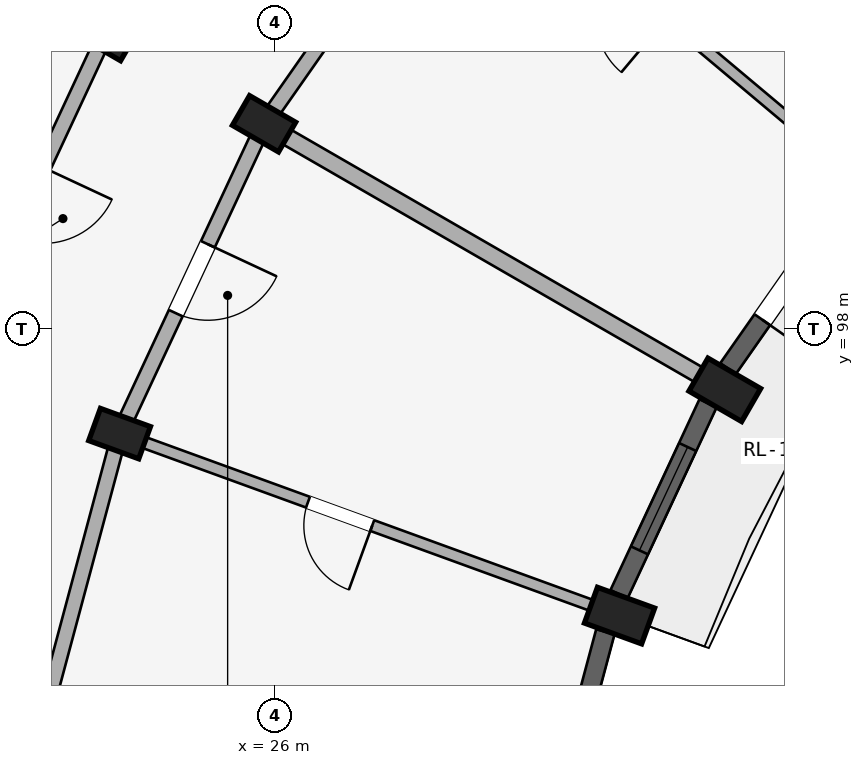
"""IFC4 building model, lengths in metres.
Left out: names, types, materials, properties, quantities, classifications, styles, units other than length and angle.
Written with IfcOpenShell. Run it as: python <this file> out.ifc"""

import sys

from ifc_helpers import new_model, si_unit, direction, frame, frame_2d, origin, origin_2d, place, context, subcontext, project, spatial, rectangle, extrude, element, fill, save


model = new_model("IFC4")
c1 = context("Model", 3, precision=1e-05, world=origin(), true_north=direction((0.0, 1.0)))
c2 = subcontext(c1, "Body", "Model", "MODEL_VIEW")
j1 = project(units=[si_unit("LENGTHUNIT", "METRE"), si_unit("PLANEANGLEUNIT", "RADIAN")], contexts=[c1])
p1 = place(None, origin())
s1 = spatial("IfcSite", under=j1, at=p1, CompositionType="ELEMENT")
p2 = place(p1, origin())
s2 = spatial("IfcBuilding", under=s1, at=p2, CompositionType="ELEMENT")
p3 = place(p2, frame((0.0, 0.0, 24.45)))
s3 = spatial("IfcBuildingStorey", under=s2, at=p3, CompositionType="ELEMENT", Elevation=24.45)
p4 = place(p3, frame((31.919, 97.2, 0.0), z_axis=(0.0, 0.0, 1.0), x_axis=(0.5, 0.866025403784, 0.0)))
e1 = element("IfcColumn", 1, at=p4, inside=s3, PredefinedType="COLUMN", context=c2, shape_type="SweptSolid", body=[
    extrude(rectangle(XDim=0.5, YDim=0.8, at=origin_2d()), origin(), (0.0, 0.0, 1.0), 2.93),
])
for number, where, z_axis, x_axis in (
    (2, (25.856, 100.7, 0.0), (0.0, 0.0, 1.0), (0.5, 0.866, 0.0)),
    (3, (23.778, 101.9, 0.0), (0.0, 0.0, 1.0), (0.5, 0.866, 0.0)),
):
    element("IfcColumn", number, at=place(p3, frame(where, z_axis=z_axis, x_axis=x_axis)), inside=s3, PredefinedType="COLUMN", context=c2, shape_type="SweptSolid", body=[
        extrude(rectangle(XDim=0.45, YDim=0.7, at=origin_2d()), origin(), (0.0, 0.0, 1.0), 2.93),
    ])
p5 = place(p3, frame((30.534, 94.23, 0.0), z_axis=(0.0, 0.0, 1.0), x_axis=(0.342020143326, 0.939692620786, 0.0)))
e4 = element("IfcColumn", 4, at=p5, inside=s3, PredefinedType="COLUMN", context=c2, shape_type="SweptSolid", body=[
    extrude(rectangle(XDim=0.5, YDim=0.8, at=origin_2d()), origin(), (0.0, 0.0, 1.0), 2.93),
])
p6 = place(p3, frame((23.956, 96.624, 0.0), z_axis=(0.0, 0.0, 1.0), x_axis=(0.342020143326, 0.939692620786, 0.0)))
e5 = element("IfcColumn", 5, at=p6, inside=s3, PredefinedType="COLUMN", context=c2, shape_type="SweptSolid", body=[
    extrude(rectangle(XDim=0.45, YDim=0.7, at=origin_2d()), origin(), (0.0, 0.0, 1.0), 2.93),
])
p7 = place(p3, frame((28.436, 104.384, 0.0), z_axis=(0.0, 0.0, 1.0), x_axis=(-0.573571637217, -0.819155404658, 0.0)))
e6 = element("IfcWall", 6, at=p7, inside=s3, PredefinedType="STANDARD", context=c2, shape_type="SweptSolid", body=[
    extrude(rectangle(XDim=4.497, YDim=0.2, at=frame_2d((2.249, 0.0))), origin(), (0.0, 0.0, 1.0), 2.372),
])
p8 = place(p3, frame((25.856, 100.7, 0.0), z_axis=(0.0, 0.0, 1.0), x_axis=(-0.422617978463, -0.906307919131, 0.0)))
e7 = element("IfcWall", 7, at=p8, inside=s3, PredefinedType="STANDARD", context=c2, shape_type="SweptSolid", body=[
    extrude(rectangle(XDim=4.497, YDim=0.2, at=frame_2d((2.249, 0.0))), origin(), (0.0, 0.0, 1.0), 2.372),
])
p9 = place(p8, frame((1.749, 0.0, 0.0)))
e8 = element("IfcOpeningElement", 8, at=p9, cuts=e7, PredefinedType="OPENING", context=c2, shape_type="SweptSolid", body=[
    extrude(rectangle(XDim=1.0, YDim=2.15, at=frame_2d((0.5, 1.075))), frame((0.0, 0.11, 0.0), z_axis=(0.0, -1.0, 0.0), x_axis=(1.0, 0.0, 0.0)), (0.0, 0.0, 1.0), 0.22),
])
p10 = place(p3, frame((23.778, 101.9, 0.0), z_axis=(0.0, 0.0, 1.0), x_axis=(-0.422629854778, -0.906302381024, 0.0)))
e9 = element("IfcWall", 9, at=p10, inside=s3, PredefinedType="STANDARD", context=c2, shape_type="SweptSolid", body=[
    extrude(rectangle(XDim=4.915, YDim=0.2, at=frame_2d((2.458, 0.0))), origin(), (0.0, 0.0, 1.0), 2.372),
])
p11 = place(p10, frame((1.958, 0.0, 0.0)))
e10 = element("IfcOpeningElement", 10, at=p11, cuts=e9, PredefinedType="OPENING", context=c2, shape_type="SweptSolid", body=[
    extrude(rectangle(XDim=1.0, YDim=2.15, at=frame_2d((0.5, 1.075))), frame((0.0, 0.11, 0.0), z_axis=(0.0, -1.0, 0.0), x_axis=(1.0, 0.0, 0.0)), (0.0, 0.0, 1.0), 0.22),
])
p12 = place(p3, frame((23.956, 96.624, 0.0), z_axis=(0.0, 0.0, 1.0), x_axis=(-0.258787642463, -0.965934240054, 0.0)))
e11 = element("IfcWall", 11, at=p12, inside=s3, PredefinedType="STANDARD", context=c2, shape_type="SweptSolid", body=[
    extrude(rectangle(XDim=4.497, YDim=0.2, at=frame_2d((2.249, 0.0))), origin(), (0.0, 0.0, 1.0), 2.372),
])
p13 = place(p3, frame((33.645, 100.013, 0.0), z_axis=(0.0, 0.0, 1.0), x_axis=(-0.766046761698, 0.642784846501, 0.0)))
e12 = element("IfcWall", 12, at=p13, inside=s3, PredefinedType="PARTITIONING", context=c2, shape_type="SweptSolid", body=[
    extrude(rectangle(XDim=6.75, YDim=0.15, at=frame_2d((3.375, 0.0))), origin(), (0.0, 0.0, 1.0), 2.372),
])
p14 = place(p13, frame((3.242, 0.0, 0.0)))
e13 = element("IfcOpeningElement", 13, at=p14, cuts=e12, PredefinedType="OPENING", context=c2, shape_type="SweptSolid", body=[
    extrude(rectangle(XDim=0.94, YDim=2.1, at=frame_2d((0.47, 1.05))), frame((0.0, 0.085, 0.0), z_axis=(0.0, -1.0, 0.0), x_axis=(1.0, 0.0, 0.0)), (0.0, 0.0, 1.0), 0.17),
])
p15 = place(p3, frame((31.746, 97.3, 0.0), z_axis=(0.0, 0.0, 1.0), x_axis=(-0.866026575979, 0.499997969693, 0.0)))
e14 = element("IfcWall", 14, at=p15, inside=s3, PredefinedType="STANDARD", context=c2, shape_type="SweptSolid", body=[
    extrude(rectangle(XDim=6.75, YDim=0.22, at=frame_2d((3.375, 0.0))), origin(), (0.0, 0.0, 1.0), 2.372),
])
p16 = place(p3, frame((30.346, 94.298, 0.0), z_axis=(0.0, 0.0, 1.0), x_axis=(-0.939696231917, 0.342010221662, 0.0)))
e15 = element("IfcWall", 15, at=p16, inside=s3, PredefinedType="PARTITIONING", context=c2, shape_type="SweptSolid", body=[
    extrude(rectangle(XDim=6.75, YDim=0.15, at=frame_2d((3.375, 0.0))), origin(), (0.0, 0.0, 1.0), 2.372),
])
p17 = place(p16, frame((3.262, 0.0, 0.0)))
e16 = element("IfcOpeningElement", 16, at=p17, cuts=e15, PredefinedType="OPENING", context=c2, shape_type="SweptSolid", body=[
    extrude(rectangle(XDim=0.9, YDim=2.1, at=frame_2d((0.45, 1.05))), frame((0.0, 0.085, 0.0), z_axis=(0.0, -1.0, 0.0), x_axis=(1.0, 0.0, 0.0)), (0.0, 0.0, 1.0), 0.17),
])
p18 = place(p3, frame((33.551, 99.748, 0.0), z_axis=(0.0, 0.0, 1.0), x_axis=(-0.573633885053, -0.819111815273, 0.0)))
e17 = element("IfcWall", 17, at=p18, inside=s3, PredefinedType="STANDARD", context=c2, shape_type="SweptSolid", body=[
    extrude(rectangle(XDim=2.77, YDim=0.25, at=frame_2d((1.385, 0.0))), origin(), (0.0, 0.0, 1.0), 2.422),
])
p19 = place(p18, frame((0.785, 0.0, 0.0)))
e18 = element("IfcOpeningElement", 18, at=p19, cuts=e17, PredefinedType="OPENING", context=c2, shape_type="SweptSolid", body=[
    extrude(rectangle(XDim=1.2, YDim=2.15, at=frame_2d((0.6, 1.075))), frame((0.0, 0.135, 0.0), z_axis=(0.0, -1.0, 0.0), x_axis=(1.0, 0.0, 0.0)), (0.0, 0.0, 1.0), 0.27),
])
p20 = place(p3, frame((31.698, 97.023, 0.0), z_axis=(0.0, 0.0, 1.0), x_axis=(-0.422649007088, -0.906293449611, 0.0)))
e19 = element("IfcWall", 19, at=p20, inside=s3, PredefinedType="STANDARD", context=c2, shape_type="SweptSolid", body=[
    extrude(rectangle(XDim=2.77, YDim=0.25, at=frame_2d((1.385, 0.0))), origin(), (0.0, 0.0, 1.0), 2.422),
])
p21 = place(p20, frame((0.635, 0.0, 0.572)))
e20 = element("IfcOpeningElement", 20, at=p21, cuts=e19, PredefinedType="OPENING", context=c2, shape_type="SweptSolid", body=[
    extrude(rectangle(XDim=1.5, YDim=1.65, at=frame_2d((0.75, 0.825))), frame((0.0, 0.135, 0.0), z_axis=(0.0, -1.0, 0.0), x_axis=(1.0, 0.0, 0.0)), (0.0, 0.0, 1.0), 0.27),
])
p22 = place(p3, frame((30.347, 94.017, 0.0), z_axis=(0.0, 0.0, 1.0), x_axis=(-0.25878161084, -0.965935855992, 0.0)))
e21 = element("IfcWall", 21, at=p22, inside=s3, PredefinedType="STANDARD", context=c2, shape_type="SweptSolid", body=[
    extrude(rectangle(XDim=2.77, YDim=0.25, at=frame_2d((1.385, 0.0))), origin(), (0.0, 0.0, 1.0), 2.422),
])
p23 = place(p22, frame((0.785, 0.0, 0.722)))
e22 = element("IfcOpeningElement", 22, at=p23, cuts=e21, PredefinedType="OPENING", context=c2, shape_type="SweptSolid", body=[
    extrude(rectangle(XDim=1.2, YDim=1.5, at=frame_2d((0.6, 0.75))), frame((0.0, 0.135, 0.0), z_axis=(0.0, -1.0, 0.0), x_axis=(1.0, 0.0, 0.0)), (0.0, 0.0, 1.0), 0.27),
])
p24 = place(p21, origin())
e23 = element("IfcWindow", 23, at=p24, inside=s3, PartitioningType="DOUBLE_PANEL_VERTICAL", PredefinedType="WINDOW", context=c2, shape_type="SweptSolid", body=[
    extrude(rectangle(XDim=1.5, YDim=1.65, at=frame_2d((0.75, 0.825))), frame((0.0, 0.03, 0.0), z_axis=(0.0, -1.0, 0.0), x_axis=(1.0, 0.0, 0.0)), (0.0, 0.0, 1.0), 0.06),
])
fill(e20, e23)
p25 = place(p17, frame((0.9, 0.0, 0.0), z_axis=(0.0, 0.0, 1.0), x_axis=(-1.0, 0.0, 0.0)))
e24 = element("IfcDoor", 24, at=p25, inside=s3, OperationType="SINGLE_SWING_RIGHT", PredefinedType="DOOR", context=c2, shape_type="SweptSolid", body=[
    extrude(rectangle(XDim=0.9, YDim=2.1, at=frame_2d((0.45, 1.05))), frame((0.0, 0.025, 0.0), z_axis=(0.0, -1.0, 0.0), x_axis=(1.0, 0.0, 0.0)), (0.0, 0.0, 1.0), 0.05),
])
fill(e16, e24)
p26 = place(p9, frame((1.0, 0.0, 0.0), z_axis=(0.0, 0.0, 1.0), x_axis=(-1.0, 0.0, 0.0)))
e25 = element("IfcDoor", 25, at=p26, inside=s3, OperationType="SINGLE_SWING_RIGHT", PredefinedType="DOOR", context=c2, shape_type="SweptSolid", body=[
    extrude(rectangle(XDim=1.0, YDim=2.15, at=frame_2d((0.5, 1.075))), frame((0.0, 0.025, 0.0), z_axis=(0.0, -1.0, 0.0), x_axis=(1.0, 0.0, 0.0)), (0.0, 0.0, 1.0), 0.05),
])
fill(e8, e25)
p27 = place(p19, origin())
e26 = element("IfcDoor", 26, at=p27, inside=s3, OperationType="SINGLE_SWING_RIGHT", PredefinedType="DOOR", context=c2, shape_type="SweptSolid", body=[
    extrude(rectangle(XDim=1.2, YDim=2.15, at=frame_2d((0.6, 1.075))), frame((0.0, 0.025, 0.0), z_axis=(0.0, -1.0, 0.0), x_axis=(1.0, 0.0, 0.0)), (0.0, 0.0, 1.0), 0.05),
])
fill(e18, e26)
save(model, sys.argv[1])
